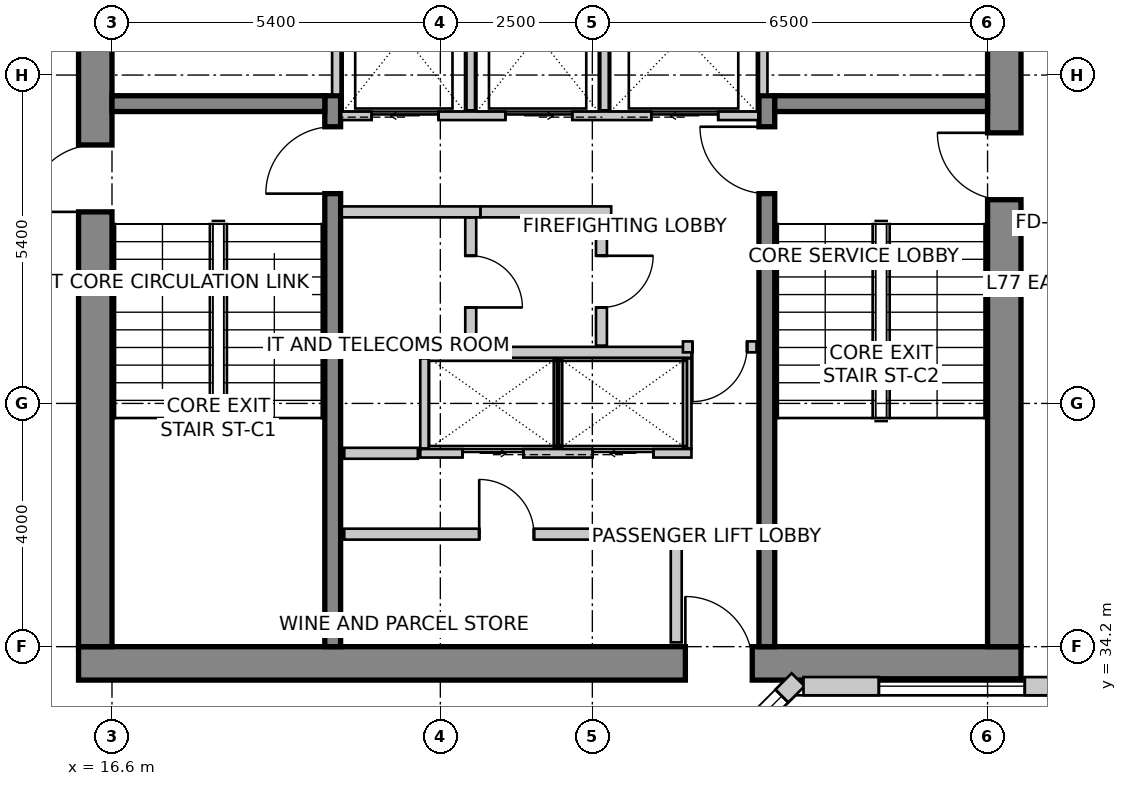
"""IFC4 building model, lengths in metres.
Left out: names, types, materials, properties, quantities, classifications, styles, units other than length and angle.
Written with IfcOpenShell. Run it as: python <this file> out.ifc"""

import sys

from ifc_helpers import new_model, si_unit, direction, frame, frame_2d, origin, place, context, subcontext, project, spatial, rectangle, extrude, source, transform, mapped, element, fill, save


model = new_model("IFC4")
c1 = context("Model", 3, precision=1e-05, world=origin(), true_north=direction((0.0, 1.0)))
c2 = subcontext(c1, "Body", "Model", "MODEL_VIEW")
j1 = project(units=[si_unit("LENGTHUNIT", "METRE"), si_unit("PLANEANGLEUNIT", "RADIAN")], contexts=[c1])
p1 = place(None, origin())
s1 = spatial("IfcSite", under=j1, at=p1, CompositionType="ELEMENT")
p2 = place(p1, origin())
s2 = spatial("IfcBuilding", under=s1, at=p2, CompositionType="ELEMENT")
p3 = place(p2, frame((0.0, 0.0, 300.5)))
s3 = spatial("IfcBuildingStorey", under=s2, at=p3, CompositionType="ELEMENT", Elevation=300.5)
p4 = place(p3, frame((16.05, 33.925, 0.0), z_axis=(0.0, 0.0, 1.0), x_axis=(1.0, 0.0, 0.0)))
e1 = element("IfcWall", 1, at=p4, inside=s3, PredefinedType="SHEAR", context=c2, shape_type="SweptSolid", body=[
    extrude(rectangle(XDim=15.5, YDim=0.55, at=frame_2d((7.75, 0.0))), origin(), (0.0, 0.0, 1.0), 4.0),
])
m1 = source(origin(), c2, "Body", "SweptSolid", [
    extrude(rectangle(XDim=1.1, YDim=2.15, at=frame_2d((0.55, 1.075))), frame((0.0, 0.285, 0.0), z_axis=(0.0, -1.0, 0.0), x_axis=(1.0, 0.0, 0.0)), (0.0, 0.0, 1.0), 0.57),
])
p5 = place(p4, frame((9.98, 0.0, 0.0)))
e2 = element("IfcOpeningElement", 2, at=p5, cuts=e1, PredefinedType="OPENING", context=c2, shape_type="MappedRepresentation", body=[
    mapped(m1, transform((0.0, 0.0, 0.0), scale=1.0)),
])
p6 = place(p3, frame((16.325, 34.2, 0.0), z_axis=(0.0, 0.0, 1.0), x_axis=(0.0, 1.0, 0.0)))
e3 = element("IfcWall", 3, at=p6, inside=s3, PredefinedType="SHEAR", context=c2, shape_type="SweptSolid", body=[
    extrude(rectangle(XDim=11.4, YDim=0.55, at=frame_2d((5.7, 0.0))), origin(), (0.0, 0.0, 1.0), 4.0),
])
p7 = place(p6, frame((7.15, 0.0, 0.0)))
e4 = element("IfcOpeningElement", 4, at=p7, cuts=e3, PredefinedType="OPENING", context=c2, shape_type="MappedRepresentation", body=[
    mapped(m1, transform((0.0, 0.0, 0.0), scale=1.0)),
])
p8 = place(p3, frame((31.275, 34.2, 0.0), z_axis=(0.0, 0.0, 1.0), x_axis=(0.0, 1.0, 0.0)))
e5 = element("IfcWall", 5, at=p8, inside=s3, PredefinedType="SHEAR", context=c2, shape_type="SweptSolid", body=[
    extrude(rectangle(XDim=11.4, YDim=0.55, at=frame_2d((5.7, 0.0))), origin(), (0.0, 0.0, 1.0), 4.0),
])
p9 = place(p8, frame((7.35, 0.0, 0.0)))
e6 = element("IfcOpeningElement", 6, at=p9, cuts=e5, PredefinedType="OPENING", context=c2, shape_type="MappedRepresentation", body=[
    mapped(m1, transform((0.0, 0.0, 0.0), scale=1.0)),
])
p10 = place(p3, frame((20.23, 34.2, 0.0), z_axis=(0.0, 0.0, 1.0), x_axis=(0.0, 1.0, 0.0)))
e7 = element("IfcWall", 7, at=p10, inside=s3, PredefinedType="SHEAR", context=c2, shape_type="SweptSolid", body=[
    extrude(rectangle(XDim=9.06, YDim=0.26, at=frame_2d((4.53, 0.0))), origin(), (0.0, 0.0, 1.0), 4.0),
])
m2 = source(origin(), c2, "Body", "SweptSolid", [
    extrude(rectangle(XDim=1.1, YDim=2.15, at=frame_2d((0.55, 1.075))), frame((0.0, 0.14, 0.0), z_axis=(0.0, -1.0, 0.0), x_axis=(1.0, 0.0, 0.0)), (0.0, 0.0, 1.0), 0.28),
])
p11 = place(p10, frame((7.45, 0.0, 0.0)))
e8 = element("IfcOpeningElement", 8, at=p11, cuts=e7, PredefinedType="OPENING", context=c2, shape_type="MappedRepresentation", body=[
    mapped(m2, transform((0.0, 0.0, 0.0), scale=1.0)),
])
p12 = place(p3, frame((27.37, 34.2, 0.0), z_axis=(0.0, 0.0, 1.0), x_axis=(0.0, 1.0, 0.0)))
e9 = element("IfcWall", 9, at=p12, inside=s3, PredefinedType="SHEAR", context=c2, shape_type="SweptSolid", body=[
    extrude(rectangle(XDim=9.06, YDim=0.26, at=frame_2d((4.53, 0.0))), origin(), (0.0, 0.0, 1.0), 4.0),
])
p13 = place(p12, frame((7.45, 0.0, 0.0)))
e10 = element("IfcOpeningElement", 10, at=p13, cuts=e9, PredefinedType="OPENING", context=c2, shape_type="MappedRepresentation", body=[
    mapped(m2, transform((0.0, 0.0, 0.0), scale=1.0)),
])
for number, where, z_axis, x_axis in (
    (11, (16.6, 43.13, 0.0), (0.0, 0.0, 1.0), (1.0, 0.0, 0.0)),
    (12, (27.5, 43.13, 0.0), (0.0, 0.0, 1.0), (1.0, 0.0, 0.0)),
):
    element("IfcWall", number, at=place(p3, frame(where, z_axis=z_axis, x_axis=x_axis)), inside=s3, PredefinedType="SHEAR", context=c2, shape_type="SweptSolid", body=[
        extrude(rectangle(XDim=3.5, YDim=0.26, at=frame_2d((1.75, 0.0))), origin(), (0.0, 0.0, 1.0), 4.0),
    ])
p14 = place(p3, frame((25.828, 31.6, 0.0), z_axis=(0.0, 0.0, 1.0), x_axis=(0.707106781187, 0.707106781187, 0.0)))
e13 = element("IfcWall", 13, at=p14, inside=s3, PredefinedType="SOLIDWALL", context=c2, shape_type="SweptSolid", body=[
    extrude(rectangle(XDim=2.907, YDim=0.3, at=frame_2d((1.454, 0.0))), origin(), (0.0, 0.0, 1.0), 3.7),
])
m3 = source(origin(), c2, "Body", "SweptSolid", [
    extrude(rectangle(XDim=1.8, YDim=2.1, at=frame_2d((0.9, 1.05))), frame((0.0, 0.16, 0.0), z_axis=(0.0, -1.0, 0.0), x_axis=(1.0, 0.0, 0.0)), (0.0, 0.0, 1.0), 0.32),
])
p15 = place(p14, frame((0.729, 0.0, 0.85)))
e14 = element("IfcOpeningElement", 14, at=p15, cuts=e13, PredefinedType="OPENING", context=c2, shape_type="MappedRepresentation", body=[
    mapped(m3, transform((0.0, 0.0, 0.0), scale=1.0)),
])
p16 = place(p3, frame((27.973, 33.55, 0.0), z_axis=(0.0, 0.0, 1.0), x_axis=(1.0, 0.0, 0.0)))
e15 = element("IfcWall", 15, at=p16, inside=s3, PredefinedType="SOLIDWALL", context=c2, shape_type="SweptSolid", body=[
    extrude(rectangle(XDim=9.115, YDim=0.3, at=frame_2d((4.558, 0.0))), origin(), (0.0, 0.0, 1.0), 3.7),
])
m4 = source(origin(), c2, "Body", "SweptSolid", [
    extrude(rectangle(XDim=2.4, YDim=2.2, at=frame_2d((1.2, 1.1))), frame((0.0, 0.16, 0.0), z_axis=(0.0, -1.0, 0.0), x_axis=(1.0, 0.0, 0.0)), (0.0, 0.0, 1.0), 0.32),
])
p17 = place(p16, frame((1.239, 0.0, 0.85)))
e16 = element("IfcOpeningElement", 16, at=p17, cuts=e15, PredefinedType="OPENING", context=c2, shape_type="MappedRepresentation", body=[
    mapped(m4, transform((0.0, 0.0, 0.0), scale=1.0)),
])
m5 = source(origin(), c2, "Body", "SweptSolid", [
    extrude(rectangle(XDim=2.8, YDim=2.4, at=frame_2d((1.4, 1.2))), frame((0.0, 0.16, 0.0), z_axis=(0.0, -1.0, 0.0), x_axis=(1.0, 0.0, 0.0)), (0.0, 0.0, 1.0), 0.32),
])
p18 = place(p16, frame((5.276, 0.0, 0.85)))
e17 = element("IfcOpeningElement", 17, at=p18, cuts=e15, PredefinedType="OPENING", context=c2, shape_type="MappedRepresentation", body=[
    mapped(m5, transform((0.0, 0.0, 0.0), scale=1.0)),
])
p19 = place(p3, frame((20.37, 42.93, 0.0), z_axis=(0.0, 0.0, 1.0), x_axis=(1.0, 0.0, 0.0)))
e18 = element("IfcWall", 18, at=p19, inside=s3, PredefinedType="SOLIDWALL", context=c2, shape_type="SweptSolid", body=[
    extrude(rectangle(XDim=6.86, YDim=0.14, at=frame_2d((3.43, 0.0))), origin(), (0.0, 0.0, 1.0), 3.7),
])
m6 = source(origin(), c2, "Body", "SweptSolid", [
    extrude(rectangle(XDim=1.1, YDim=2.15, at=frame_2d((0.55, 1.075))), frame((0.0, 0.08, 0.0), z_axis=(0.0, -1.0, 0.0), x_axis=(1.0, 0.0, 0.0)), (0.0, 0.0, 1.0), 0.16),
])
p20 = place(p19, frame((0.5, 0.0, 0.0)))
e19 = element("IfcOpeningElement", 19, at=p20, cuts=e18, PredefinedType="OPENING", context=c2, shape_type="MappedRepresentation", body=[
    mapped(m6, transform((0.0, 0.0, 0.0), scale=1.0)),
])
p21 = place(p19, frame((2.7, 0.0, 0.0)))
e20 = element("IfcOpeningElement", 20, at=p21, cuts=e18, PredefinedType="OPENING", context=c2, shape_type="MappedRepresentation", body=[
    mapped(m6, transform((0.0, 0.0, 0.0), scale=1.0)),
])
p22 = place(p19, frame((5.1, 0.0, 0.0)))
e21 = element("IfcOpeningElement", 21, at=p22, cuts=e18, PredefinedType="OPENING", context=c2, shape_type="MappedRepresentation", body=[
    mapped(m6, transform((0.0, 0.0, 0.0), scale=1.0)),
])
for number, where, z_axis, x_axis in (
    (22, (20.29, 43.28, 0.0), (0.0, 0.0, 1.0), (0.0, 1.0, 0.0)),
    (23, (27.31, 43.28, 0.0), (0.0, 0.0, 1.0), (0.0, 1.0, 0.0)),
):
    element("IfcWall", number, at=place(p3, frame(where, z_axis=z_axis, x_axis=x_axis)), inside=s3, PredefinedType="SOLIDWALL", context=c2, shape_type="SweptSolid", body=[
        extrude(rectangle(XDim=2.3, YDim=0.14, at=frame_2d((1.15, 0.0))), origin(), (0.0, 0.0, 1.0), 3.7),
    ])
for number, where, z_axis, x_axis in (
    (24, (22.5, 43.02, 0.0), (0.0, 0.0, 1.0), (0.0, 1.0, 0.0)),
    (25, (24.7, 43.02, 0.0), (0.0, 0.0, 1.0), (0.0, 1.0, 0.0)),
):
    element("IfcWall", number, at=place(p3, frame(where, z_axis=z_axis, x_axis=x_axis)), inside=s3, PredefinedType="SOLIDWALL", context=c2, shape_type="SweptSolid", body=[
        extrude(rectangle(XDim=2.56, YDim=0.14, at=frame_2d((1.28, 0.0))), origin(), (0.0, 0.0, 1.0), 3.7),
    ])
p23 = place(p3, frame((21.67, 37.38, 0.0), z_axis=(0.0, 0.0, 1.0), x_axis=(1.0, 0.0, 0.0)))
e26 = element("IfcWall", 26, at=p23, inside=s3, PredefinedType="SOLIDWALL", context=c2, shape_type="SweptSolid", body=[
    extrude(rectangle(XDim=4.46, YDim=0.14, at=frame_2d((2.23, 0.0))), origin(), (0.0, 0.0, 1.0), 3.7),
])
m7 = source(origin(), c2, "Body", "SweptSolid", [
    extrude(rectangle(XDim=1.0, YDim=2.15, at=frame_2d((0.5, 1.075))), frame((0.0, 0.08, 0.0), z_axis=(0.0, -1.0, 0.0), x_axis=(1.0, 0.0, 0.0)), (0.0, 0.0, 1.0), 0.16),
])
p24 = place(p23, frame((0.695, 0.0, 0.0)))
e27 = element("IfcOpeningElement", 27, at=p24, cuts=e26, PredefinedType="OPENING", context=c2, shape_type="MappedRepresentation", body=[
    mapped(m7, transform((0.0, 0.0, 0.0), scale=1.0)),
])
p25 = place(p23, frame((2.835, 0.0, 0.0)))
e28 = element("IfcOpeningElement", 28, at=p25, cuts=e26, PredefinedType="OPENING", context=c2, shape_type="MappedRepresentation", body=[
    mapped(m7, transform((0.0, 0.0, 0.0), scale=1.0)),
])
p26 = place(p3, frame((21.67, 39.04, 0.0), z_axis=(0.0, 0.0, 1.0), x_axis=(1.0, 0.0, 0.0)))
e29 = element("IfcWall", 29, at=p26, inside=s3, PredefinedType="SOLIDWALL", context=c2, shape_type="SweptSolid", body=[
    extrude(rectangle(XDim=4.46, YDim=0.18, at=frame_2d((2.23, 0.0))), origin(), (0.0, 0.0, 1.0), 3.7),
])
for number, where, z_axis, x_axis in (
    (30, (26.06, 37.46, 0.0), (0.0, 0.0, 1.0), (0.0, 1.0, 0.0)),
    (31, (21.74, 37.46, 0.0), (0.0, 0.0, 1.0), (0.0, 1.0, 0.0)),
    (32, (23.935, 37.46, 0.0), (0.0, 0.0, 1.0), (0.0, 1.0, 0.0)),
):
    element("IfcWall", number, at=place(p3, frame(where, z_axis=z_axis, x_axis=x_axis)), inside=s3, PredefinedType="SOLIDWALL", context=c2, shape_type="SweptSolid", body=[
        extrude(rectangle(XDim=1.48, YDim=0.14, at=frame_2d((0.74, 0.0))), origin(), (0.0, 0.0, 1.0), 3.7),
    ])
p27 = place(p3, frame((22.66, 41.35, 0.0), z_axis=(0.0, 0.0, 1.0), x_axis=(-1.0, 0.0, 0.0)))
e33 = element("IfcWall", 33, at=p27, inside=s3, PredefinedType="PARTITIONING", context=c2, shape_type="SweptSolid", body=[
    extrude(rectangle(XDim=2.28, YDim=0.18, at=frame_2d((1.14, 0.0))), origin(), (0.0, 0.0, 1.0), 3.7),
])
p28 = place(p3, frame((24.81, 41.35, 0.0), z_axis=(0.0, 0.0, 1.0), x_axis=(-1.0, 0.0, 0.0)))
e34 = element("IfcWall", 34, at=p28, inside=s3, PredefinedType="PARTITIONING", context=c2, shape_type="SweptSolid", body=[
    extrude(rectangle(XDim=2.148, YDim=0.18, at=frame_2d((1.074, 0.0))), origin(), (0.0, 0.0, 1.0), 3.7),
])
p29 = place(p3, frame((22.5, 41.256, 0.0), z_axis=(0.0, 0.0, 1.0), x_axis=(0.0, -1.0, 0.0)))
e35 = element("IfcWall", 35, at=p29, inside=s3, PredefinedType="PARTITIONING", context=c2, shape_type="SweptSolid", body=[
    extrude(rectangle(XDim=2.106, YDim=0.18, at=frame_2d((1.053, 0.0))), origin(), (0.0, 0.0, 1.0), 3.7),
])
m8 = source(origin(), c2, "Body", "SweptSolid", [
    extrude(rectangle(XDim=0.85, YDim=2.15, at=frame_2d((0.425, 1.075))), frame((0.0, 0.1, 0.0), z_axis=(0.0, -1.0, 0.0), x_axis=(1.0, 0.0, 0.0)), (0.0, 0.0, 1.0), 0.2),
])
p30 = place(p29, frame((0.628, 0.0, 0.0)))
e36 = element("IfcOpeningElement", 36, at=p30, cuts=e35, PredefinedType="OPENING", context=c2, shape_type="MappedRepresentation", body=[
    mapped(m8, transform((0.0, 0.0, 0.0), scale=1.0)),
])
p31 = place(p3, frame((21.63, 37.38, 0.0), z_axis=(0.0, 0.0, 1.0), x_axis=(-1.0, 0.0, 0.0)))
e37 = element("IfcWall", 37, at=p31, inside=s3, PredefinedType="PARTITIONING", context=c2, shape_type="SweptSolid", body=[
    extrude(rectangle(XDim=1.21, YDim=0.18, at=frame_2d((0.605, 0.0))), origin(), (0.0, 0.0, 1.0), 3.7),
])
p32 = place(p3, frame((24.65, 41.256, 0.0), z_axis=(0.0, 0.0, 1.0), x_axis=(0.0, -1.0, 0.0)))
e38 = element("IfcWall", 38, at=p32, inside=s3, PredefinedType="PARTITIONING", context=c2, shape_type="SweptSolid", body=[
    extrude(rectangle(XDim=2.106, YDim=0.18, at=frame_2d((1.053, 0.0))), origin(), (0.0, 0.0, 1.0), 3.7),
])
p33 = place(p32, frame((0.628, 0.0, 0.0)))
e39 = element("IfcOpeningElement", 39, at=p33, cuts=e38, PredefinedType="OPENING", context=c2, shape_type="MappedRepresentation", body=[
    mapped(m8, transform((0.0, 0.0, 0.0), scale=1.0)),
])
p34 = place(p3, frame((27.2, 39.13, 0.0), z_axis=(0.0, 0.0, 1.0), x_axis=(-1.0, 0.0, 0.0)))
e40 = element("IfcWall", 40, at=p34, inside=s3, PredefinedType="PARTITIONING", context=c2, shape_type="SweptSolid", body=[
    extrude(rectangle(XDim=1.21, YDim=0.18, at=frame_2d((0.605, 0.0))), origin(), (0.0, 0.0, 1.0), 3.7),
])
m9 = source(origin(), c2, "Body", "SweptSolid", [
    extrude(rectangle(XDim=0.9, YDim=2.15, at=frame_2d((0.45, 1.075))), frame((0.0, 0.1, 0.0), z_axis=(0.0, -1.0, 0.0), x_axis=(1.0, 0.0, 0.0)), (0.0, 0.0, 1.0), 0.2),
])
p35 = place(p34, frame((0.155, 0.0, 0.0)))
e41 = element("IfcOpeningElement", 41, at=p35, cuts=e40, PredefinedType="OPENING", context=c2, shape_type="MappedRepresentation", body=[
    mapped(m9, transform((0.0, 0.0, 0.0), scale=1.0)),
])
p36 = place(p3, frame((20.42, 36.05, 0.0), z_axis=(0.0, 0.0, 1.0), x_axis=(1.0, 0.0, 0.0)))
e42 = element("IfcWall", 42, at=p36, inside=s3, PredefinedType="PARTITIONING", context=c2, shape_type="SweptSolid", body=[
    extrude(rectangle(XDim=5.46, YDim=0.18, at=frame_2d((2.73, 0.0))), origin(), (0.0, 0.0, 1.0), 3.7),
])
p37 = place(p36, frame((2.219, 0.0, 0.0)))
e43 = element("IfcOpeningElement", 43, at=p37, cuts=e42, PredefinedType="OPENING", context=c2, shape_type="MappedRepresentation", body=[
    mapped(m9, transform((0.0, 0.0, 0.0), scale=1.0)),
])
p38 = place(p3, frame((25.88, 35.956, 0.0), z_axis=(0.0, 0.0, 1.0), x_axis=(0.0, -1.0, 0.0)))
e44 = element("IfcWall", 44, at=p38, inside=s3, PredefinedType="PARTITIONING", context=c2, shape_type="SweptSolid", body=[
    extrude(rectangle(XDim=1.686, YDim=0.18, at=frame_2d((0.843, 0.0))), origin(), (0.0, 0.0, 1.0), 2.992),
])
m10 = source(origin(), c2, "Body", "SweptSolid", [
    extrude(rectangle(XDim=1.8, YDim=2.1, at=frame_2d((0.9, 1.05))), frame((0.0, -0.015, 0.0), z_axis=(0.0, -1.0, 0.0), x_axis=(1.0, 0.0, 0.0)), (0.0, 0.0, 1.0), 0.06),
])
p39 = place(p15, origin())
e45 = element("IfcWindow", 45, at=p39, inside=s3, PartitioningType="SINGLE_PANEL", PredefinedType="WINDOW", context=c2, shape_type="MappedRepresentation", body=[
    mapped(m10, transform((0.0, 0.0, 0.0), scale=1.0)),
])
fill(e14, e45)
m11 = source(origin(), c2, "Body", "SweptSolid", [
    extrude(rectangle(XDim=2.4, YDim=2.2, at=frame_2d((1.2, 1.1))), frame((0.0, -0.015, 0.0), z_axis=(0.0, -1.0, 0.0), x_axis=(1.0, 0.0, 0.0)), (0.0, 0.0, 1.0), 0.06),
])
p40 = place(p17, origin())
e46 = element("IfcWindow", 46, at=p40, inside=s3, PartitioningType="SINGLE_PANEL", PredefinedType="WINDOW", context=c2, shape_type="MappedRepresentation", body=[
    mapped(m11, transform((0.0, 0.0, 0.0), scale=1.0)),
])
fill(e16, e46)
m12 = source(origin(), c2, "Body", "SweptSolid", [
    extrude(rectangle(XDim=1.1, YDim=2.15, at=frame_2d((0.55, 1.075))), frame((0.0, 0.025, 0.0), z_axis=(0.0, -1.0, 0.0), x_axis=(1.0, 0.0, 0.0)), (0.0, 0.0, 1.0), 0.05),
])
p41 = place(p20, origin())
e47 = element("IfcDoor", 47, at=p41, inside=s3, OperationType="SLIDING_TO_LEFT", PredefinedType="DOOR", context=c2, shape_type="MappedRepresentation", body=[
    mapped(m12, transform((0.0, 0.0, 0.0), scale=1.0)),
])
fill(e19, e47)
p42 = place(p21, origin())
e48 = element("IfcDoor", 48, at=p42, inside=s3, OperationType="SLIDING_TO_RIGHT", PredefinedType="DOOR", context=c2, shape_type="MappedRepresentation", body=[
    mapped(m12, transform((0.0, 0.0, 0.0), scale=1.0)),
])
fill(e20, e48)
m13 = source(origin(), c2, "Body", "SweptSolid", [
    extrude(rectangle(XDim=1.1, YDim=2.15, at=frame_2d((0.55, 1.075))), frame((0.0, 0.025, 0.0), z_axis=(0.0, -1.0, 0.0), x_axis=(1.0, 0.0, 0.0)), (0.0, 0.0, 1.0), 0.05),
])
p43 = place(p22, origin())
e49 = element("IfcDoor", 49, at=p43, inside=s3, OperationType="SLIDING_TO_LEFT", PredefinedType="DOOR", context=c2, shape_type="MappedRepresentation", body=[
    mapped(m13, transform((0.0, 0.0, 0.0), scale=1.0)),
])
fill(e21, e49)
m14 = source(origin(), c2, "Body", "SweptSolid", [
    extrude(rectangle(XDim=1.0, YDim=2.15, at=frame_2d((0.5, 1.075))), frame((0.0, 0.025, 0.0), z_axis=(0.0, -1.0, 0.0), x_axis=(1.0, 0.0, 0.0)), (0.0, 0.0, 1.0), 0.05),
])
p44 = place(p24, origin())
e50 = element("IfcDoor", 50, at=p44, inside=s3, OperationType="SLIDING_TO_RIGHT", PredefinedType="DOOR", context=c2, shape_type="MappedRepresentation", body=[
    mapped(m14, transform((0.0, 0.0, 0.0), scale=1.0)),
])
fill(e27, e50)
p45 = place(p25, origin())
e51 = element("IfcDoor", 51, at=p45, inside=s3, OperationType="SLIDING_TO_LEFT", PredefinedType="DOOR", context=c2, shape_type="MappedRepresentation", body=[
    mapped(m14, transform((0.0, 0.0, 0.0), scale=1.0)),
])
fill(e28, e51)
m15 = source(origin(), c2, "Body", "SweptSolid", [
    extrude(rectangle(XDim=1.1, YDim=2.15, at=frame_2d((0.55, 1.075))), frame((0.0, 0.025, 0.0), z_axis=(0.0, -1.0, 0.0), x_axis=(1.0, 0.0, 0.0)), (0.0, 0.0, 1.0), 0.05),
])
p46 = place(p11, origin())
e52 = element("IfcDoor", 52, at=p46, inside=s3, OperationType="SINGLE_SWING_LEFT", PredefinedType="DOOR", context=c2, shape_type="MappedRepresentation", body=[
    mapped(m15, transform((0.0, 0.0, 0.0), scale=1.0)),
])
fill(e8, e52)
p47 = place(p13, origin())
e53 = element("IfcDoor", 53, at=p47, inside=s3, OperationType="SINGLE_SWING_RIGHT", PredefinedType="DOOR", context=c2, shape_type="MappedRepresentation", body=[
    mapped(m15, transform((0.0, 0.0, 0.0), scale=1.0)),
])
fill(e10, e53)
p48 = place(p7, origin())
e54 = element("IfcDoor", 54, at=p48, inside=s3, OperationType="SINGLE_SWING_LEFT", PredefinedType="DOOR", context=c2, shape_type="MappedRepresentation", body=[
    mapped(m15, transform((0.0, 0.0, 0.0), scale=1.0)),
])
fill(e4, e54)
p49 = place(p9, origin())
e55 = element("IfcDoor", 55, at=p49, inside=s3, OperationType="SINGLE_SWING_RIGHT", PredefinedType="DOOR", context=c2, shape_type="MappedRepresentation", body=[
    mapped(m15, transform((0.0, 0.0, 0.0), scale=1.0)),
])
fill(e6, e55)
p50 = place(p5, origin())
e56 = element("IfcDoor", 56, at=p50, inside=s3, OperationType="SINGLE_SWING_LEFT", PredefinedType="DOOR", context=c2, shape_type="MappedRepresentation", body=[
    mapped(m15, transform((0.0, 0.0, 0.0), scale=1.0)),
])
fill(e2, e56)
m16 = source(origin(), c2, "Body", "SweptSolid", [
    extrude(rectangle(XDim=0.85, YDim=2.15, at=frame_2d((0.425, 1.075))), frame((0.0, 0.025, 0.0), z_axis=(0.0, -1.0, 0.0), x_axis=(1.0, 0.0, 0.0)), (0.0, 0.0, 1.0), 0.05),
])
p51 = place(p30, origin())
e57 = element("IfcDoor", 57, at=p51, inside=s3, OperationType="SINGLE_SWING_RIGHT", PredefinedType="DOOR", context=c2, shape_type="MappedRepresentation", body=[
    mapped(m16, transform((0.0, 0.0, 0.0), scale=1.0)),
])
fill(e36, e57)
p52 = place(p33, origin())
e58 = element("IfcDoor", 58, at=p52, inside=s3, OperationType="SINGLE_SWING_LEFT", PredefinedType="DOOR", context=c2, shape_type="MappedRepresentation", body=[
    mapped(m16, transform((0.0, 0.0, 0.0), scale=1.0)),
])
fill(e39, e58)
m17 = source(origin(), c2, "Body", "SweptSolid", [
    extrude(rectangle(XDim=0.9, YDim=2.15, at=frame_2d((0.45, 1.075))), frame((0.0, 0.025, 0.0), z_axis=(0.0, -1.0, 0.0), x_axis=(1.0, 0.0, 0.0)), (0.0, 0.0, 1.0), 0.05),
])
p53 = place(p35, origin())
e59 = element("IfcDoor", 59, at=p53, inside=s3, OperationType="SINGLE_SWING_RIGHT", PredefinedType="DOOR", context=c2, shape_type="MappedRepresentation", body=[
    mapped(m17, transform((0.0, 0.0, 0.0), scale=1.0)),
])
fill(e41, e59)
p54 = place(p37, origin())
e60 = element("IfcDoor", 60, at=p54, inside=s3, OperationType="SINGLE_SWING_LEFT", PredefinedType="DOOR", context=c2, shape_type="MappedRepresentation", body=[
    mapped(m17, transform((0.0, 0.0, 0.0), scale=1.0)),
])
fill(e43, e60)
save(model, sys.argv[1])
